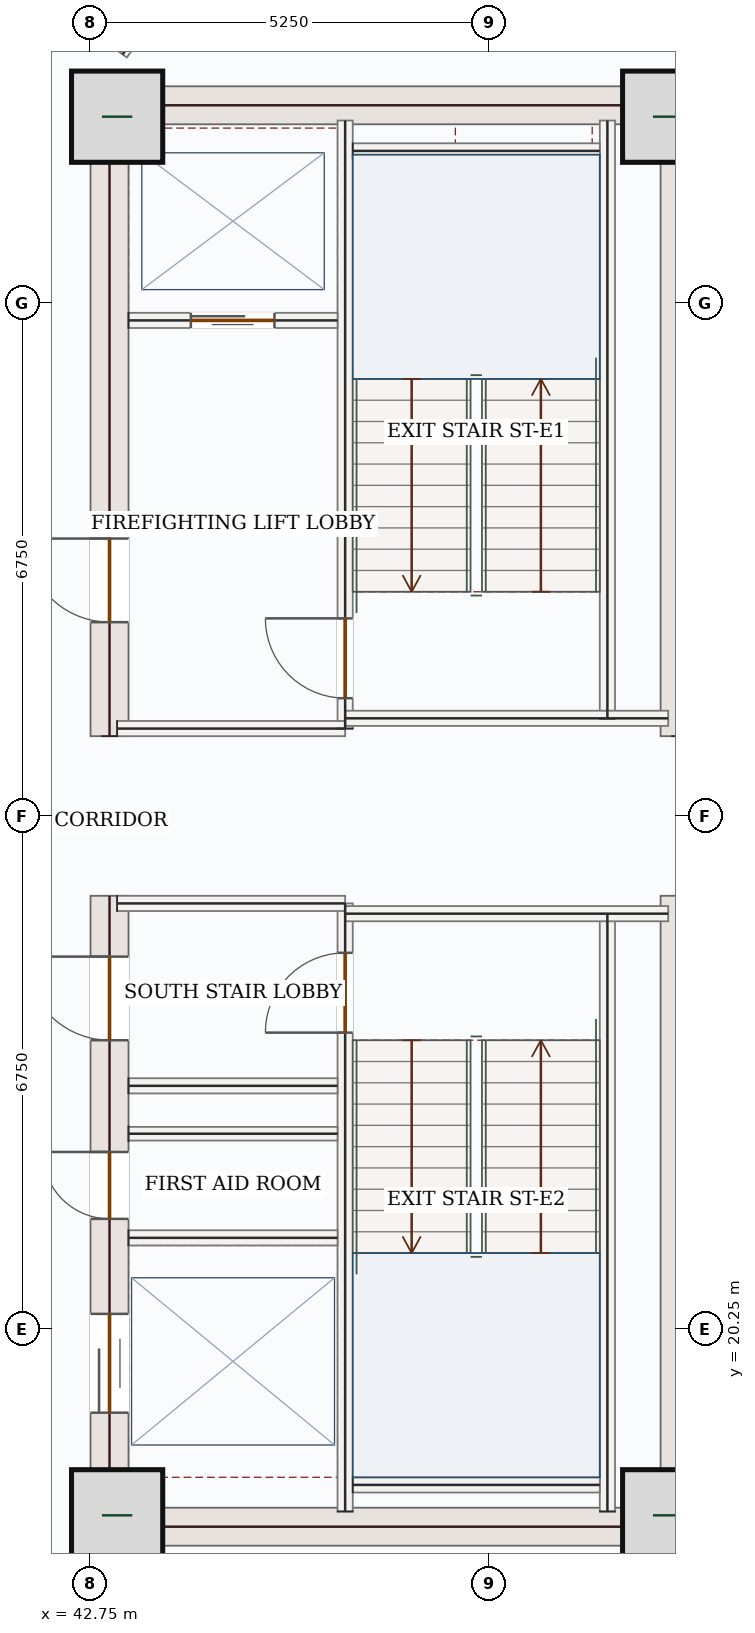
"""IFC4 building model, lengths in metres.
Left out: names, types, materials, properties, quantities, classifications, styles, units other than length and angle.
Written with IfcOpenShell. Run it as: python <this file> out.ifc"""

import sys

from ifc_helpers import new_model, si_unit, direction, frame, frame_2d, origin, origin_2d, place, context, subcontext, project, spatial, rectangle, extrude, source, transform, mapped, element, fill, save


model = new_model("IFC4")
c1 = context("Model", 3, precision=1e-05, world=origin(), true_north=direction((0.0, 1.0)))
c2 = subcontext(c1, "Body", "Model", "MODEL_VIEW")
j1 = project(units=[si_unit("LENGTHUNIT", "METRE"), si_unit("PLANEANGLEUNIT", "RADIAN")], contexts=[c1])
p1 = place(None, origin())
s1 = spatial("IfcSite", under=j1, at=p1, CompositionType="ELEMENT")
p2 = place(p1, origin())
s2 = spatial("IfcBuilding", under=s1, at=p2, CompositionType="ELEMENT")
p3 = place(p2, frame((0.0, 0.0, 139.5)))
s3 = spatial("IfcBuildingStorey", under=s2, at=p3, CompositionType="ELEMENT", Elevation=139.5)
p4 = place(p3, frame((43.0, 17.4, 0.0), z_axis=(0.0, 0.0, 1.0), x_axis=(0.0, 1.0, 0.0)))
e1 = element("IfcWall", 1, at=p4, inside=s3, PredefinedType="SHEAR", context=c2, shape_type="SweptSolid", body=[
    extrude(rectangle(XDim=8.55, YDim=0.5, at=frame_2d((4.275, 0.0))), origin(), (0.0, 0.0, 1.0), 3.62),
])
p5 = place(p4, frame((6.65, 0.0, 0.0)))
e2 = element("IfcOpeningElement", 2, at=p5, cuts=e1, PredefinedType="OPENING", context=c2, shape_type="SweptSolid", body=[
    extrude(rectangle(XDim=1.1, YDim=2.2, at=frame_2d((0.55, 1.1))), frame((0.0, 0.26, 0.0), z_axis=(0.0, -1.0, 0.0), x_axis=(1.0, 0.0, 0.0)), (0.0, 0.0, 1.0), 0.52),
])
p6 = place(p4, frame((1.75, 0.0, 0.0)))
e3 = element("IfcOpeningElement", 3, at=p6, cuts=e1, PredefinedType="OPENING", context=c2, shape_type="SweptSolid", body=[
    extrude(rectangle(XDim=1.3, YDim=2.2, at=frame_2d((0.65, 1.1))), frame((0.0, 0.26, 0.0), z_axis=(0.0, -1.0, 0.0), x_axis=(1.0, 0.0, 0.0)), (0.0, 0.0, 1.0), 0.52),
])
p7 = place(p4, frame((4.3, 0.0, 0.0)))
e4 = element("IfcOpeningElement", 4, at=p7, cuts=e1, PredefinedType="OPENING", context=c2, shape_type="SweptSolid", body=[
    extrude(rectangle(XDim=0.88, YDim=2.1, at=frame_2d((0.44, 1.05))), frame((0.0, 0.26, 0.0), z_axis=(0.0, -1.0, 0.0), x_axis=(1.0, 0.0, 0.0)), (0.0, 0.0, 1.0), 0.52),
])
p8 = place(p3, frame((43.0, 28.05, 0.0), z_axis=(0.0, 0.0, 1.0), x_axis=(0.0, 1.0, 0.0)))
e5 = element("IfcWall", 5, at=p8, inside=s3, PredefinedType="SHEAR", context=c2, shape_type="SweptSolid", body=[
    extrude(rectangle(XDim=8.55, YDim=0.5, at=frame_2d((4.275, 0.0))), origin(), (0.0, 0.0, 1.0), 3.62),
])
p9 = place(p8, frame((1.5, 0.0, 0.0)))
e6 = element("IfcOpeningElement", 6, at=p9, cuts=e5, PredefinedType="OPENING", context=c2, shape_type="SweptSolid", body=[
    extrude(rectangle(XDim=1.1, YDim=2.2, at=frame_2d((0.55, 1.1))), frame((0.0, 0.26, 0.0), z_axis=(0.0, -1.0, 0.0), x_axis=(1.0, 0.0, 0.0)), (0.0, 0.0, 1.0), 0.52),
])
m1 = source(origin(), c2, "Body", "SweptSolid", [
    extrude(rectangle(XDim=8.55, YDim=0.5, at=frame_2d((4.275, 0.0))), origin(), (0.0, 0.0, 1.0), 3.62),
])
for number, where, z_axis, x_axis in (
    (7, (50.5, 17.4, 0.0), (0.0, 0.0, 1.0), (0.0, 1.0, 0.0)),
    (8, (50.5, 28.05, 0.0), (0.0, 0.0, 1.0), (0.0, 1.0, 0.0)),
):
    element("IfcWall", number, at=place(p3, frame(where, z_axis=z_axis, x_axis=x_axis)), inside=s3, PredefinedType="SHEAR", context=c2, shape_type="MappedRepresentation", body=[
        mapped(m1, transform((0.0, 0.0, 0.0), x_axis=(1.0, 0.0, 0.0), y_axis=(0.0, 1.0, 0.0), z_axis=(0.0, 0.0, 1.0), scale=1.0)),
    ])
m2 = source(origin(), c2, "Body", "SweptSolid", [
    extrude(rectangle(XDim=7.0, YDim=0.5, at=frame_2d((3.5, 0.0))), origin(), (0.0, 0.0, 1.0), 3.62),
])
for number, where, z_axis, x_axis in (
    (9, (43.25, 17.65, 0.0), (0.0, 0.0, 1.0), (1.0, 0.0, 0.0)),
    (10, (43.25, 36.35, 0.0), (0.0, 0.0, 1.0), (1.0, 0.0, 0.0)),
):
    element("IfcWall", number, at=place(p3, frame(where, z_axis=z_axis, x_axis=x_axis)), inside=s3, PredefinedType="SHEAR", context=c2, shape_type="MappedRepresentation", body=[
        mapped(m2, transform((0.0, 0.0, 0.0), x_axis=(1.0, 0.0, 0.0), y_axis=(0.0, 1.0, 0.0), z_axis=(0.0, 0.0, 1.0), scale=1.0)),
    ])
m3 = source(origin(), c2, "Body", "SweptSolid", [
    extrude(rectangle(XDim=1.2, YDim=1.2, at=origin_2d()), origin(), (0.0, 0.0, 1.0), 3.9),
])
for number, where, z_axis, x_axis in (
    (11, (43.1, 17.8, 0.0), (0.0, 0.0, 1.0), (1.0, 0.0, 0.0)),
    (12, (50.35, 17.8, 0.0), (0.0, 0.0, 1.0), (1.0, 0.0, 0.0)),
    (13, (43.1, 36.2, 0.0), (0.0, 0.0, 1.0), (1.0, 0.0, 0.0)),
    (14, (50.35, 36.2, 0.0), (0.0, 0.0, 1.0), (1.0, 0.0, 0.0)),
):
    element("IfcColumn", number, at=place(p3, frame(where, z_axis=z_axis, x_axis=x_axis)), inside=s3, PredefinedType="COLUMN", context=c2, shape_type="MappedRepresentation", body=[
        mapped(m3, transform((0.0, 0.0, 0.0), x_axis=(1.0, 0.0, 0.0), y_axis=(0.0, 1.0, 0.0), z_axis=(0.0, 0.0, 1.0), scale=1.0)),
    ])
m4 = source(origin(), c2, "Body", "SweptSolid", [
    extrude(rectangle(XDim=5.258, YDim=0.28, at=frame_2d((2.629, 0.0))), origin(), (0.0, 0.0, 1.0), 3.62),
])
p10 = place(p3, frame((53.06, 18.458, 0.0), z_axis=(0.0, 0.0, 1.0), x_axis=(-0.707106781187, -0.707106781187, 0.0)))
e15 = element("IfcWall", 15, at=p10, inside=s3, PredefinedType="SOLIDWALL", context=c2, shape_type="MappedRepresentation", body=[
    mapped(m4, transform((0.0, 0.0, 0.0), x_axis=(1.0, 0.0, 0.0), y_axis=(0.0, 1.0, 0.0), z_axis=(0.0, 0.0, 1.0), scale=1.0)),
])
m5 = source(origin(), c2, "Body", "SweptSolid", [
    extrude(rectangle(XDim=3.967, YDim=0.28, at=frame_2d((1.984, 0.0))), origin(), (0.0, 0.0, 1.0), 3.62),
])
p11 = place(p3, frame((49.342, 39.26, 0.0), z_axis=(0.0, 0.0, 1.0), x_axis=(0.707076011326, -0.707137549708, 0.0)))
e16 = element("IfcWall", 16, at=p11, inside=s3, PredefinedType="SOLIDWALL", context=c2, shape_type="MappedRepresentation", body=[
    mapped(m5, transform((0.0, 0.0, 0.0), x_axis=(1.0, 0.0, 0.0), y_axis=(0.0, 1.0, 0.0), z_axis=(0.0, 0.0, 1.0), scale=1.0)),
])
m6 = source(origin(), c2, "Body", "SweptSolid", [
    extrude(rectangle(XDim=7.87, YDim=0.2, at=frame_2d((3.935, 0.0))), origin(), (0.0, 0.0, 1.0), 3.62),
])
for number, where, z_axis, x_axis in (
    (17, (49.55, 17.85, 0.0), (0.0, 0.0, 1.0), (0.0, 1.0, 0.0)),
    (18, (49.55, 28.28, 0.0), (0.0, 0.0, 1.0), (0.0, 1.0, 0.0)),
):
    element("IfcWall", number, at=place(p3, frame(where, z_axis=z_axis, x_axis=x_axis)), inside=s3, PredefinedType="SOLIDWALL", context=c2, shape_type="MappedRepresentation", body=[
        mapped(m6, transform((0.0, 0.0, 0.0), x_axis=(1.0, 0.0, 0.0), y_axis=(0.0, 1.0, 0.0), z_axis=(0.0, 0.0, 1.0), scale=1.0)),
    ])
p12 = place(p3, frame((46.1, 17.85, 0.0), z_axis=(0.0, 0.0, 1.0), x_axis=(0.0, 1.0, 0.0)))
e19 = element("IfcWall", 19, at=p12, inside=s3, PredefinedType="SOLIDWALL", context=c2, shape_type="SweptSolid", body=[
    extrude(rectangle(XDim=8.0, YDim=0.2, at=frame_2d((4.0, 0.0))), origin(), (0.0, 0.0, 1.0), 3.62),
])
p13 = place(p12, frame((6.3, 0.0, 0.0)))
e20 = element("IfcOpeningElement", 20, at=p13, cuts=e19, PredefinedType="OPENING", context=c2, shape_type="SweptSolid", body=[
    extrude(rectangle(XDim=1.05, YDim=2.15, at=frame_2d((0.525, 1.075))), frame((0.0, 0.11, 0.0), z_axis=(0.0, -1.0, 0.0), x_axis=(1.0, 0.0, 0.0)), (0.0, 0.0, 1.0), 0.22),
])
p14 = place(p3, frame((46.1, 28.15, 0.0), z_axis=(0.0, 0.0, 1.0), x_axis=(0.0, 1.0, 0.0)))
e21 = element("IfcWall", 21, at=p14, inside=s3, PredefinedType="SOLIDWALL", context=c2, shape_type="SweptSolid", body=[
    extrude(rectangle(XDim=8.0, YDim=0.2, at=frame_2d((4.0, 0.0))), origin(), (0.0, 0.0, 1.0), 3.62),
])
p15 = place(p14, frame((0.4, 0.0, 0.0)))
e22 = element("IfcOpeningElement", 22, at=p15, cuts=e21, PredefinedType="OPENING", context=c2, shape_type="SweptSolid", body=[
    extrude(rectangle(XDim=1.05, YDim=2.15, at=frame_2d((0.525, 1.075))), frame((0.0, 0.11, 0.0), z_axis=(0.0, -1.0, 0.0), x_axis=(1.0, 0.0, 0.0)), (0.0, 0.0, 1.0), 0.22),
])
m7 = source(origin(), c2, "Body", "SweptSolid", [
    extrude(rectangle(XDim=3.0, YDim=0.2, at=frame_2d((1.5, 0.0))), origin(), (0.0, 0.0, 1.0), 3.62),
])
p16 = place(p3, frame((43.1, 25.85, 0.0), z_axis=(0.0, 0.0, 1.0), x_axis=(1.0, 0.0, 0.0)))
e23 = element("IfcWall", 23, at=p16, inside=s3, PredefinedType="SOLIDWALL", context=c2, shape_type="MappedRepresentation", body=[
    mapped(m7, transform((0.0, 0.0, 0.0), x_axis=(1.0, 0.0, 0.0), y_axis=(0.0, 1.0, 0.0), z_axis=(0.0, 0.0, 1.0), scale=1.0)),
])
m8 = source(origin(), c2, "Body", "SweptSolid", [
    extrude(rectangle(XDim=4.25, YDim=0.2, at=frame_2d((2.125, 0.0))), origin(), (0.0, 0.0, 1.0), 3.62),
])
p17 = place(p3, frame((46.1, 25.715, 0.0), z_axis=(0.0, 0.0, 1.0), x_axis=(1.0, 0.0, 0.0)))
e24 = element("IfcWall", 24, at=p17, inside=s3, PredefinedType="SOLIDWALL", context=c2, shape_type="MappedRepresentation", body=[
    mapped(m8, transform((0.0, 0.0, 0.0), x_axis=(1.0, 0.0, 0.0), y_axis=(0.0, 1.0, 0.0), z_axis=(0.0, 0.0, 1.0), scale=1.0)),
])
p18 = place(p3, frame((43.1, 28.15, 0.0), z_axis=(0.0, 0.0, 1.0), x_axis=(1.0, 0.0, 0.0)))
e25 = element("IfcWall", 25, at=p18, inside=s3, PredefinedType="SOLIDWALL", context=c2, shape_type="MappedRepresentation", body=[
    mapped(m7, transform((0.0, 0.0, 0.0), x_axis=(1.0, 0.0, 0.0), y_axis=(0.0, 1.0, 0.0), z_axis=(0.0, 0.0, 1.0), scale=1.0)),
])
p19 = place(p3, frame((46.1, 28.285, 0.0), z_axis=(0.0, 0.0, 1.0), x_axis=(1.0, 0.0, 0.0)))
e26 = element("IfcWall", 26, at=p19, inside=s3, PredefinedType="SOLIDWALL", context=c2, shape_type="MappedRepresentation", body=[
    mapped(m8, transform((0.0, 0.0, 0.0), x_axis=(1.0, 0.0, 0.0), y_axis=(0.0, 1.0, 0.0), z_axis=(0.0, 0.0, 1.0), scale=1.0)),
])
m9 = source(origin(), c2, "Body", "SweptSolid", [
    extrude(rectangle(XDim=3.25, YDim=0.2, at=frame_2d((1.625, 0.0))), origin(), (0.0, 0.0, 1.0), 3.62),
])
for number, where, z_axis, x_axis in (
    (27, (46.2, 35.75, 0.0), (0.0, 0.0, 1.0), (1.0, 0.0, 0.0)),
    (28, (46.2, 18.2, 0.0), (0.0, 0.0, 1.0), (1.0, 0.0, 0.0)),
):
    element("IfcWall", number, at=place(p3, frame(where, z_axis=z_axis, x_axis=x_axis)), inside=s3, PredefinedType="SOLIDWALL", context=c2, shape_type="MappedRepresentation", body=[
        mapped(m9, transform((0.0, 0.0, 0.0), x_axis=(1.0, 0.0, 0.0), y_axis=(0.0, 1.0, 0.0), z_axis=(0.0, 0.0, 1.0), scale=1.0)),
    ])
p20 = place(p3, frame((43.25, 33.52, 0.0), z_axis=(0.0, 0.0, 1.0), x_axis=(1.0, 0.0, 0.0)))
e29 = element("IfcWall", 29, at=p20, inside=s3, PredefinedType="SOLIDWALL", context=c2, shape_type="SweptSolid", body=[
    extrude(rectangle(XDim=2.75, YDim=0.2, at=frame_2d((1.375, 0.0))), origin(), (0.0, 0.0, 1.0), 3.62),
])
p21 = place(p20, frame((0.82, 0.0, 0.0)))
e30 = element("IfcOpeningElement", 30, at=p21, cuts=e29, PredefinedType="OPENING", context=c2, shape_type="SweptSolid", body=[
    extrude(rectangle(XDim=1.1, YDim=2.15, at=frame_2d((0.55, 1.075))), frame((0.0, 0.11, 0.0), z_axis=(0.0, -1.0, 0.0), x_axis=(1.0, 0.0, 0.0)), (0.0, 0.0, 1.0), 0.22),
])
m10 = source(origin(), c2, "Body", "SweptSolid", [
    extrude(rectangle(XDim=2.75, YDim=0.2, at=frame_2d((1.375, 0.0))), origin(), (0.0, 0.0, 1.0), 3.62),
])
for number, where, z_axis, x_axis in (
    (31, (43.25, 23.45, 0.0), (0.0, 0.0, 1.0), (1.0, 0.0, 0.0)),
    (32, (43.25, 21.45, 0.0), (0.0, 0.0, 1.0), (1.0, 0.0, 0.0)),
):
    element("IfcWall", number, at=place(p3, frame(where, z_axis=z_axis, x_axis=x_axis)), inside=s3, PredefinedType="SOLIDWALL", context=c2, shape_type="MappedRepresentation", body=[
        mapped(m10, transform((0.0, 0.0, 0.0), x_axis=(1.0, 0.0, 0.0), y_axis=(0.0, 1.0, 0.0), z_axis=(0.0, 0.0, 1.0), scale=1.0)),
    ])
m11 = source(origin(), c2, "Body", "SweptSolid", [
    extrude(rectangle(XDim=2.75, YDim=0.18, at=frame_2d((1.375, 0.0))), origin(), (0.0, 0.0, 1.0), 3.62),
])
p22 = place(p3, frame((43.25, 22.82, 0.0), z_axis=(0.0, 0.0, 1.0), x_axis=(1.0, 0.0, 0.0)))
e33 = element("IfcWall", 33, at=p22, inside=s3, PredefinedType="PARTITIONING", context=c2, shape_type="MappedRepresentation", body=[
    mapped(m11, transform((0.0, 0.0, 0.0), x_axis=(1.0, 0.0, 0.0), y_axis=(0.0, 1.0, 0.0), z_axis=(0.0, 0.0, 1.0), scale=1.0)),
])
m12 = source(origin(), c2, "Body", "SweptSolid", [
    extrude(rectangle(XDim=2.582, YDim=0.14, at=frame_2d((1.291, 0.0))), origin(), (0.0, 0.0, 1.0), 3.62),
])
p23 = place(p3, frame((44.68, 39.115, 0.0), z_axis=(0.0, 0.0, 1.0), x_axis=(-0.584533864389, -0.811369312572, 0.0)))
e34 = element("IfcWall", 34, at=p23, inside=s3, PredefinedType="PARTITIONING", context=c2, shape_type="MappedRepresentation", body=[
    mapped(m12, transform((0.0, 0.0, 0.0), x_axis=(1.0, 0.0, 0.0), y_axis=(0.0, 1.0, 0.0), z_axis=(0.0, 0.0, 1.0), scale=1.0)),
])
m13 = source(origin(), c2, "Body", "SweptSolid", [
    extrude(rectangle(XDim=1.05, YDim=2.15, at=frame_2d((0.525, 1.075))), frame((0.0, 0.025, 0.0), z_axis=(0.0, -1.0, 0.0), x_axis=(1.0, 0.0, 0.0)), (0.0, 0.0, 1.0), 0.05),
])
p24 = place(p15, origin())
e35 = element("IfcDoor", 35, at=p24, inside=s3, OperationType="SINGLE_SWING_RIGHT", PredefinedType="DOOR", context=c2, shape_type="MappedRepresentation", body=[
    mapped(m13, transform((0.0, 0.0, 0.0), x_axis=(1.0, 0.0, 0.0), y_axis=(0.0, 1.0, 0.0), z_axis=(0.0, 0.0, 1.0), scale=1.0)),
])
fill(e22, e35)
p25 = place(p13, origin())
e36 = element("IfcDoor", 36, at=p25, inside=s3, OperationType="SINGLE_SWING_LEFT", PredefinedType="DOOR", context=c2, shape_type="MappedRepresentation", body=[
    mapped(m13, transform((0.0, 0.0, 0.0), x_axis=(1.0, 0.0, 0.0), y_axis=(0.0, 1.0, 0.0), z_axis=(0.0, 0.0, 1.0), scale=1.0)),
])
fill(e20, e36)
m14 = source(origin(), c2, "Body", "SweptSolid", [
    extrude(rectangle(XDim=1.1, YDim=2.15, at=frame_2d((0.55, 1.075))), frame((0.0, 0.025, 0.0), z_axis=(0.0, -1.0, 0.0), x_axis=(1.0, 0.0, 0.0)), (0.0, 0.0, 1.0), 0.05),
])
p26 = place(p21, origin())
e37 = element("IfcDoor", 37, at=p26, inside=s3, OperationType="DOUBLE_DOOR_SLIDING", PredefinedType="DOOR", context=c2, shape_type="MappedRepresentation", body=[
    mapped(m14, transform((0.0, 0.0, 0.0), x_axis=(1.0, 0.0, 0.0), y_axis=(0.0, 1.0, 0.0), z_axis=(0.0, 0.0, 1.0), scale=1.0)),
])
fill(e30, e37)
m15 = source(origin(), c2, "Body", "SweptSolid", [
    extrude(rectangle(XDim=1.1, YDim=2.2, at=frame_2d((0.55, 1.1))), frame((0.0, 0.025, 0.0), z_axis=(0.0, -1.0, 0.0), x_axis=(1.0, 0.0, 0.0)), (0.0, 0.0, 1.0), 0.05),
])
p27 = place(p9, origin())
e38 = element("IfcDoor", 38, at=p27, inside=s3, OperationType="SINGLE_SWING_RIGHT", PredefinedType="DOOR", context=c2, shape_type="MappedRepresentation", body=[
    mapped(m15, transform((0.0, 0.0, 0.0), x_axis=(1.0, 0.0, 0.0), y_axis=(0.0, 1.0, 0.0), z_axis=(0.0, 0.0, 1.0), scale=1.0)),
])
fill(e6, e38)
p28 = place(p5, origin())
e39 = element("IfcDoor", 39, at=p28, inside=s3, OperationType="SINGLE_SWING_RIGHT", PredefinedType="DOOR", context=c2, shape_type="MappedRepresentation", body=[
    mapped(m15, transform((0.0, 0.0, 0.0), x_axis=(1.0, 0.0, 0.0), y_axis=(0.0, 1.0, 0.0), z_axis=(0.0, 0.0, 1.0), scale=1.0)),
])
fill(e2, e39)
m16 = source(origin(), c2, "Body", "SweptSolid", [
    extrude(rectangle(XDim=1.3, YDim=2.2, at=frame_2d((0.65, 1.1))), frame((0.0, 0.025, 0.0), z_axis=(0.0, -1.0, 0.0), x_axis=(1.0, 0.0, 0.0)), (0.0, 0.0, 1.0), 0.05),
])
p29 = place(p6, origin())
e40 = element("IfcDoor", 40, at=p29, inside=s3, OperationType="DOUBLE_DOOR_SLIDING", PredefinedType="DOOR", context=c2, shape_type="MappedRepresentation", body=[
    mapped(m16, transform((0.0, 0.0, 0.0), x_axis=(1.0, 0.0, 0.0), y_axis=(0.0, 1.0, 0.0), z_axis=(0.0, 0.0, 1.0), scale=1.0)),
])
fill(e3, e40)
m17 = source(origin(), c2, "Body", "SweptSolid", [
    extrude(rectangle(XDim=0.88, YDim=2.1, at=frame_2d((0.44, 1.05))), frame((0.0, 0.025, 0.0), z_axis=(0.0, -1.0, 0.0), x_axis=(1.0, 0.0, 0.0)), (0.0, 0.0, 1.0), 0.05),
])
p30 = place(p7, origin())
e41 = element("IfcDoor", 41, at=p30, inside=s3, OperationType="SINGLE_SWING_RIGHT", PredefinedType="DOOR", context=c2, shape_type="MappedRepresentation", body=[
    mapped(m17, transform((0.0, 0.0, 0.0), x_axis=(1.0, 0.0, 0.0), y_axis=(0.0, 1.0, 0.0), z_axis=(0.0, 0.0, 1.0), scale=1.0)),
])
fill(e4, e41)
save(model, sys.argv[1])
